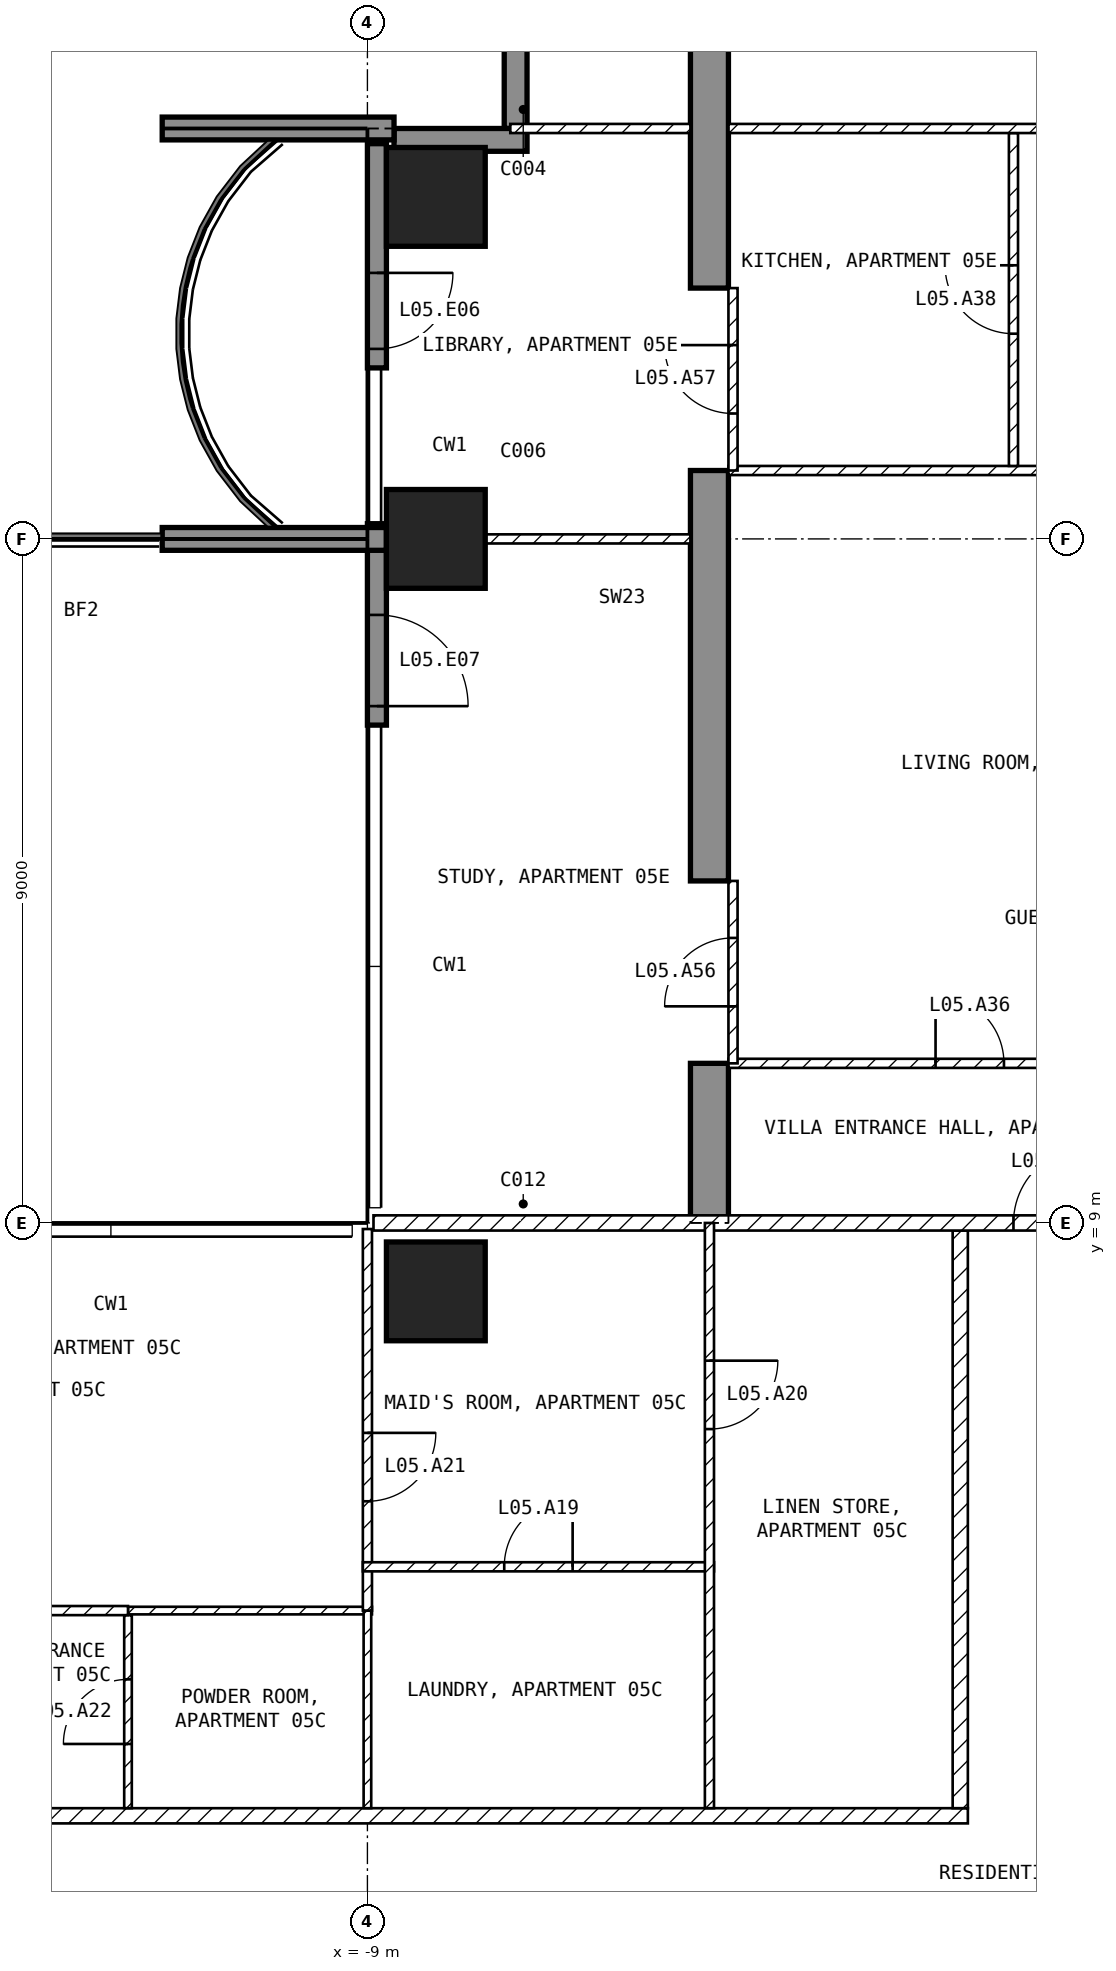
"""IFC4 building model, lengths in metres.
Left out: names, types, materials, properties, quantities, classifications, styles, units other than length and angle.
Written with IfcOpenShell. Run it as: python <this file> out.ifc"""

import sys

from ifc_helpers import new_model, si_unit, direction, frame, frame_2d, origin, origin_2d, place, context, subcontext, project, spatial, polyline, rectangle, outline, extrude, element, fill, save


model = new_model("IFC4")
c1 = context("Model", 3, precision=1e-05, world=origin(), true_north=direction((0.0, 1.0)))
c2 = subcontext(c1, "Body", "Model", "MODEL_VIEW")
j1 = project(units=[si_unit("LENGTHUNIT", "METRE"), si_unit("PLANEANGLEUNIT", "RADIAN")], contexts=[c1])
p1 = place(None, origin())
s1 = spatial("IfcSite", under=j1, at=p1, CompositionType="ELEMENT")
p2 = place(p1, origin())
s2 = spatial("IfcBuilding", under=s1, at=p2, CompositionType="ELEMENT")
p3 = place(p2, frame((0.0, 0.0, 36.5)))
s3 = spatial("IfcBuildingStorey", under=s2, at=p3, CompositionType="ELEMENT", Elevation=36.5)
for number, where, z_axis, x_axis in (
    (1, (-8.1, 8.1, -0.25), (0.0, 0.0, 1.0), (1.0, 0.0, 0.0)),
    (2, (-8.1, 18.0, -0.25), (0.0, 0.0, 1.0), (1.0, 0.0, 0.0)),
    (3, (-8.1, 22.5, -0.25), (0.0, 0.0, 1.0), (1.0, 0.0, 0.0)),
):
    element("IfcColumn", number, at=place(p3, frame(where, z_axis=z_axis, x_axis=x_axis)), inside=s3, PredefinedType="COLUMN", context=c2, shape_type="SweptSolid", body=[
        extrude(rectangle(XDim=1.3, YDim=1.3, at=origin_2d()), origin(), (0.0, 0.0, 1.0), 3.5),
    ])
p4 = place(p3, frame((-4.75, 9.0, -0.25), z_axis=(1.0, 0.0, 0.0), x_axis=(0.0, 1.0, 0.0)))
e4 = element("IfcWall", 4, at=p4, inside=s3, PredefinedType="SHEAR", context=c2, shape_type="SweptSolid", body=[
    extrude(outline(polyline([(0.0, 0.0), (2.1, 0.0), (2.1, 2.65), (4.5, 2.65), (4.5, 0.0), (9.9, 0.0), (9.9, 2.65), (12.3, 2.65), (12.3, 0.0), (16.45, 0.0), (16.45, 3.5), (0.0, 3.5), (0.0, 0.0)])), origin(), (0.0, 0.0, 1.0), 0.5),
])
p5 = place(p3, frame((-8.875, 23.2, 0.0), z_axis=(0.0, 0.0, 1.0), x_axis=(0.0, -1.0, 0.0)))
e5 = element("IfcWall", 5, at=p5, inside=s3, PredefinedType="SOLIDWALL", context=c2, shape_type="SweptSolid", body=[
    extrude(rectangle(XDim=2.95, YDim=0.25, at=frame_2d((1.475, 0.0))), origin(), (0.0, 0.0, 1.0), 3.25),
])
p6 = place(p5, frame((1.7, 0.0, 0.0)))
e6 = element("IfcOpeningElement", 6, at=p6, cuts=e5, PredefinedType="OPENING", context=c2, shape_type="SweptSolid", body=[
    extrude(rectangle(XDim=1.0, YDim=2.4, at=frame_2d((0.5, 1.2))), frame((0.0, 0.135, 0.0), z_axis=(0.0, -1.0, 0.0), x_axis=(1.0, 0.0, 0.0)), (0.0, 0.0, 1.0), 0.27),
])
p7 = place(p3, frame((-8.875, 18.2, 0.0), z_axis=(0.0, 0.0, 1.0), x_axis=(0.0, -1.0, 0.0)))
e7 = element("IfcWall", 7, at=p7, inside=s3, PredefinedType="SOLIDWALL", context=c2, shape_type="SweptSolid", body=[
    extrude(rectangle(XDim=2.65, YDim=0.25, at=frame_2d((1.325, 0.0))), origin(), (0.0, 0.0, 1.0), 3.25),
])
p8 = place(p7, frame((1.2, 0.0, 0.0)))
e8 = element("IfcOpeningElement", 8, at=p8, cuts=e7, PredefinedType="OPENING", context=c2, shape_type="SweptSolid", body=[
    extrude(rectangle(XDim=1.2, YDim=2.4, at=frame_2d((0.6, 1.2))), frame((0.0, 0.135, 0.0), z_axis=(0.0, -1.0, 0.0), x_axis=(1.0, 0.0, 0.0)), (0.0, 0.0, 1.0), 0.27),
])
p9 = place(p3, frame((-7.05, 25.2, 0.0), z_axis=(0.0, 0.0, 1.0), x_axis=(0.0, -1.0, 0.0)))
e9 = element("IfcWall", 9, at=p9, inside=s3, PredefinedType="SOLIDWALL", context=c2, shape_type="SweptSolid", body=[
    extrude(rectangle(XDim=1.8, YDim=0.3, at=frame_2d((0.9, 0.0))), origin(), (0.0, 0.0, 1.0), 3.25),
])
p10 = place(p3, frame((-6.9, 23.25, 0.0), z_axis=(0.0, 0.0, 1.0), x_axis=(-1.0, 0.0, 0.0)))
e10 = element("IfcWall", 10, at=p10, inside=s3, PredefinedType="SOLIDWALL", context=c2, shape_type="SweptSolid", body=[
    extrude(rectangle(XDim=1.75, YDim=0.3, at=frame_2d((0.875, 0.0))), origin(), (0.0, 0.0, 1.0), 3.25),
])
p11 = place(p3, frame((-8.75, 18.0, 0.0), z_axis=(0.0, 0.0, 1.0), x_axis=(-1.0, 0.0, 0.0)))
e11 = element("IfcWall", 11, at=p11, inside=s3, PredefinedType="SOLIDWALL", context=c2, shape_type="SweptSolid", body=[
    extrude(rectangle(XDim=2.95, YDim=0.3, at=frame_2d((1.475, 0.0))), origin(), (0.0, 0.0, 1.0), 3.25),
])
p12 = place(p3, frame((-8.65, 23.4, 0.0), z_axis=(0.0, 0.0, 1.0), x_axis=(-1.0, 0.0, 0.0)))
e12 = element("IfcWall", 12, at=p12, inside=s3, PredefinedType="SOLIDWALL", context=c2, shape_type="SweptSolid", body=[
    extrude(rectangle(XDim=3.05, YDim=0.3, at=frame_2d((1.525, 0.0))), origin(), (0.0, 0.0, 1.0), 3.25),
])
p13 = place(p3, frame((-21.6, 1.2, 0.0), z_axis=(0.0, 0.0, 1.0), x_axis=(1.0, 0.0, 0.0)))
e13 = element("IfcWall", 13, at=p13, inside=s3, PredefinedType="PARTITIONING", context=c2, shape_type="SweptSolid", body=[
    extrude(rectangle(XDim=20.5, YDim=0.2, at=frame_2d((10.25, 0.0))), origin(), (0.0, 0.0, 1.0), 3.25),
])
p14 = place(p13, frame((7.225, 0.0, 0.0)))
e14 = element("IfcOpeningElement", 14, at=p14, cuts=e13, PredefinedType="OPENING", context=c2, shape_type="SweptSolid", body=[
    extrude(rectangle(XDim=1.0, YDim=2.1, at=frame_2d((0.5, 1.05))), frame((0.0, 0.11, 0.0), z_axis=(0.0, -1.0, 0.0), x_axis=(1.0, 0.0, 0.0)), (0.0, 0.0, 1.0), 0.22),
])
p15 = place(p3, frame((-1.2, 1.3, 0.0), z_axis=(0.0, 0.0, 1.0), x_axis=(0.0, 1.0, 0.0)))
e15 = element("IfcWall", 15, at=p15, inside=s3, PredefinedType="PARTITIONING", context=c2, shape_type="SweptSolid", body=[
    extrude(rectangle(XDim=7.6, YDim=0.2, at=frame_2d((3.8, 0.0))), origin(), (0.0, 0.0, 1.0), 3.25),
])
p16 = place(p3, frame((-8.92, 9.0, 0.0), z_axis=(0.0, 0.0, 1.0), x_axis=(1.0, 0.0, 0.0)))
e16 = element("IfcWall", 16, at=p16, inside=s3, PredefinedType="PARTITIONING", context=c2, shape_type="SweptSolid", body=[
    extrude(rectangle(XDim=17.84, YDim=0.2, at=frame_2d((8.92, 0.0))), origin(), (0.0, 0.0, 1.0), 3.25),
])
p17 = place(p16, frame((8.42, 0.0, 0.0)))
e17 = element("IfcOpeningElement", 17, at=p17, cuts=e16, PredefinedType="OPENING", context=c2, shape_type="SweptSolid", body=[
    extrude(rectangle(XDim=1.0, YDim=2.1, at=frame_2d((0.5, 1.05))), frame((0.0, 0.11, 0.0), z_axis=(0.0, -1.0, 0.0), x_axis=(1.0, 0.0, 0.0)), (0.0, 0.0, 1.0), 0.22),
])
p18 = place(p3, frame((-12.15, 1.3, 0.0), z_axis=(0.0, 0.0, 1.0), x_axis=(0.0, 1.0, 0.0)))
e18 = element("IfcWall", 18, at=p18, inside=s3, PredefinedType="PARTITIONING", context=c2, shape_type="SweptSolid", body=[
    extrude(rectangle(XDim=2.54, YDim=0.1, at=frame_2d((1.27, 0.0))), origin(), (0.0, 0.0, 1.0), 3.25),
])
p19 = place(p18, frame((0.845, 0.0, 0.0)))
e19 = element("IfcOpeningElement", 19, at=p19, cuts=e18, PredefinedType="OPENING", context=c2, shape_type="SweptSolid", body=[
    extrude(rectangle(XDim=0.85, YDim=2.1, at=frame_2d((0.425, 1.05))), frame((0.0, 0.06, 0.0), z_axis=(0.0, -1.0, 0.0), x_axis=(1.0, 0.0, 0.0)), (0.0, 0.0, 1.0), 0.12),
])
p20 = place(p3, frame((-12.15, 3.9, 0.0), z_axis=(0.0, 0.0, 1.0), x_axis=(1.0, 0.0, 0.0)))
e20 = element("IfcWall", 20, at=p20, inside=s3, PredefinedType="PARTITIONING", context=c2, shape_type="SweptSolid", body=[
    extrude(rectangle(XDim=3.21, YDim=0.1, at=frame_2d((1.605, 0.0))), origin(), (0.0, 0.0, 1.0), 3.25),
])
p21 = place(p3, frame((-9.0, 3.9, 0.0), z_axis=(0.0, 0.0, 1.0), x_axis=(0.0, -1.0, 0.0)))
e21 = element("IfcWall", 21, at=p21, inside=s3, PredefinedType="PARTITIONING", context=c2, shape_type="SweptSolid", body=[
    extrude(rectangle(XDim=2.6, YDim=0.1, at=frame_2d((1.3, 0.0))), origin(), (0.0, 0.0, 1.0), 3.25),
])
p22 = place(p3, frame((-21.6, 3.9, 0.0), z_axis=(0.0, 0.0, 1.0), x_axis=(1.0, 0.0, 0.0)))
e22 = element("IfcWall", 22, at=p22, inside=s3, PredefinedType="PARTITIONING", context=c2, shape_type="SweptSolid", body=[
    extrude(rectangle(XDim=9.45, YDim=0.12, at=frame_2d((4.725, 0.0))), origin(), (0.0, 0.0, 1.0), 3.25),
])
p23 = place(p22, frame((7.425, 0.0, 0.0)))
e23 = element("IfcOpeningElement", 23, at=p23, cuts=e22, PredefinedType="OPENING", context=c2, shape_type="SweptSolid", body=[
    extrude(rectangle(XDim=0.9, YDim=2.1, at=frame_2d((0.45, 1.05))), frame((0.0, 0.07, 0.0), z_axis=(0.0, -1.0, 0.0), x_axis=(1.0, 0.0, 0.0)), (0.0, 0.0, 1.0), 0.14),
])
p24 = place(p22, frame((0.45, 0.0, 0.0)))
e24 = element("IfcOpeningElement", 24, at=p24, cuts=e22, PredefinedType="OPENING", context=c2, shape_type="SweptSolid", body=[
    extrude(rectangle(XDim=0.9, YDim=2.1, at=frame_2d((0.45, 1.05))), frame((0.0, 0.07, 0.0), z_axis=(0.0, -1.0, 0.0), x_axis=(1.0, 0.0, 0.0)), (0.0, 0.0, 1.0), 0.14),
])
p25 = place(p3, frame((-9.0, 8.92, 0.0), z_axis=(0.0, 0.0, 1.0), x_axis=(0.0, -1.0, 0.0)))
e25 = element("IfcWall", 25, at=p25, inside=s3, PredefinedType="PARTITIONING", context=c2, shape_type="SweptSolid", body=[
    extrude(rectangle(XDim=5.02, YDim=0.12, at=frame_2d((2.51, 0.0))), origin(), (0.0, 0.0, 1.0), 3.25),
])
p26 = place(p25, frame((2.682, 0.0, 0.0)))
e26 = element("IfcOpeningElement", 26, at=p26, cuts=e25, PredefinedType="OPENING", context=c2, shape_type="SweptSolid", body=[
    extrude(rectangle(XDim=0.9, YDim=2.1, at=frame_2d((0.45, 1.05))), frame((0.0, 0.07, 0.0), z_axis=(0.0, -1.0, 0.0), x_axis=(1.0, 0.0, 0.0)), (0.0, 0.0, 1.0), 0.14),
])
p27 = place(p3, frame((-9.06, 4.476, 0.0), z_axis=(0.0, 0.0, 1.0), x_axis=(1.0, 0.0, 0.0)))
e27 = element("IfcWall", 27, at=p27, inside=s3, PredefinedType="PARTITIONING", context=c2, shape_type="SweptSolid", body=[
    extrude(rectangle(XDim=4.62, YDim=0.12, at=frame_2d((2.31, 0.0))), origin(), (0.0, 0.0, 1.0), 3.25),
])
p28 = place(p27, frame((1.86, 0.0, 0.0)))
e28 = element("IfcOpeningElement", 28, at=p28, cuts=e27, PredefinedType="OPENING", context=c2, shape_type="SweptSolid", body=[
    extrude(rectangle(XDim=0.9, YDim=2.1, at=frame_2d((0.45, 1.05))), frame((0.0, 0.07, 0.0), z_axis=(0.0, -1.0, 0.0), x_axis=(1.0, 0.0, 0.0)), (0.0, 0.0, 1.0), 0.14),
])
p29 = place(p3, frame((-4.5, 9.0, 0.0), z_axis=(0.0, 0.0, 1.0), x_axis=(0.0, -1.0, 0.0)))
e29 = element("IfcWall", 29, at=p29, inside=s3, PredefinedType="PARTITIONING", context=c2, shape_type="SweptSolid", body=[
    extrude(rectangle(XDim=7.7, YDim=0.12, at=frame_2d((3.85, 0.0))), origin(), (0.0, 0.0, 1.0), 3.25),
])
p30 = place(p29, frame((1.812, 0.0, 0.0)))
e30 = element("IfcOpeningElement", 30, at=p30, cuts=e29, PredefinedType="OPENING", context=c2, shape_type="SweptSolid", body=[
    extrude(rectangle(XDim=0.9, YDim=2.1, at=frame_2d((0.45, 1.05))), frame((0.0, 0.07, 0.0), z_axis=(0.0, -1.0, 0.0), x_axis=(1.0, 0.0, 0.0)), (0.0, 0.0, 1.0), 0.14),
])
p31 = place(p3, frame((-4.25, 11.1, 0.0), z_axis=(0.0, 0.0, 1.0), x_axis=(1.0, 0.0, 0.0)))
e31 = element("IfcWall", 31, at=p31, inside=s3, PredefinedType="PARTITIONING", context=c2, shape_type="SweptSolid", body=[
    extrude(rectangle(XDim=6.35, YDim=0.12, at=frame_2d((3.175, 0.0))), origin(), (0.0, 0.0, 1.0), 3.25),
])
p32 = place(p31, frame((2.725, 0.0, 0.0)))
e32 = element("IfcOpeningElement", 32, at=p32, cuts=e31, PredefinedType="OPENING", context=c2, shape_type="SweptSolid", body=[
    extrude(rectangle(XDim=0.9, YDim=2.1, at=frame_2d((0.45, 1.05))), frame((0.0, 0.07, 0.0), z_axis=(0.0, -1.0, 0.0), x_axis=(1.0, 0.0, 0.0)), (0.0, 0.0, 1.0), 0.14),
])
p33 = place(p3, frame((-4.25, 18.9, 0.0), z_axis=(0.0, 0.0, 1.0), x_axis=(1.0, 0.0, 0.0)))
e33 = element("IfcWall", 33, at=p33, inside=s3, PredefinedType="PARTITIONING", context=c2, shape_type="SweptSolid", body=[
    extrude(rectangle(XDim=8.5, YDim=0.12, at=frame_2d((4.25, 0.0))), origin(), (0.0, 0.0, 1.0), 3.25),
])
p34 = place(p33, frame((5.675, 0.0, 0.0)))
e34 = element("IfcOpeningElement", 34, at=p34, cuts=e33, PredefinedType="OPENING", context=c2, shape_type="SweptSolid", body=[
    extrude(rectangle(XDim=0.9, YDim=2.1, at=frame_2d((0.45, 1.05))), frame((0.0, 0.07, 0.0), z_axis=(0.0, -1.0, 0.0), x_axis=(1.0, 0.0, 0.0)), (0.0, 0.0, 1.0), 0.14),
])
p35 = place(p3, frame((-0.5, 18.96, 0.0), z_axis=(0.0, 0.0, 1.0), x_axis=(0.0, 1.0, 0.0)))
e35 = element("IfcWall", 35, at=p35, inside=s3, PredefinedType="PARTITIONING", context=c2, shape_type="SweptSolid", body=[
    extrude(rectangle(XDim=4.38, YDim=0.12, at=frame_2d((2.19, 0.0))), origin(), (0.0, 0.0, 1.0), 3.25),
])
p36 = place(p35, frame((1.74, 0.0, 0.0)))
e36 = element("IfcOpeningElement", 36, at=p36, cuts=e35, PredefinedType="OPENING", context=c2, shape_type="SweptSolid", body=[
    extrude(rectangle(XDim=0.9, YDim=2.1, at=frame_2d((0.45, 1.05))), frame((0.0, 0.07, 0.0), z_axis=(0.0, -1.0, 0.0), x_axis=(1.0, 0.0, 0.0)), (0.0, 0.0, 1.0), 0.14),
])
p37 = place(p3, frame((-4.25, 23.4, 0.0), z_axis=(0.0, 0.0, 1.0), x_axis=(1.0, 0.0, 0.0)))
e37 = element("IfcWall", 37, at=p37, inside=s3, PredefinedType="PARTITIONING", context=c2, shape_type="SweptSolid", body=[
    extrude(rectangle(XDim=8.5, YDim=0.12, at=frame_2d((4.25, 0.0))), origin(), (0.0, 0.0, 1.0), 3.25),
])
p38 = place(p37, frame((5.675, 0.0, 0.0)))
e38 = element("IfcOpeningElement", 38, at=p38, cuts=e37, PredefinedType="OPENING", context=c2, shape_type="SweptSolid", body=[
    extrude(rectangle(XDim=0.9, YDim=2.1, at=frame_2d((0.45, 1.05))), frame((0.0, 0.07, 0.0), z_axis=(0.0, -1.0, 0.0), x_axis=(1.0, 0.0, 0.0)), (0.0, 0.0, 1.0), 0.14),
])
p39 = place(p3, frame((-7.45, 18.0, 0.0), z_axis=(0.0, 0.0, 1.0), x_axis=(1.0, 0.0, 0.0)))
e39 = element("IfcWall", 39, at=p39, inside=s3, PredefinedType="PARTITIONING", context=c2, shape_type="SweptSolid", body=[
    extrude(rectangle(XDim=2.7, YDim=0.12, at=frame_2d((1.35, 0.0))), origin(), (0.0, 0.0, 1.0), 2.346),
])
p40 = place(p3, frame((-7.12, 23.4, 0.0), z_axis=(0.0, 0.0, 1.0), x_axis=(1.0, 0.0, 0.0)))
e40 = element("IfcWall", 40, at=p40, inside=s3, PredefinedType="PARTITIONING", context=c2, shape_type="SweptSolid", body=[
    extrude(rectangle(XDim=2.37, YDim=0.12, at=frame_2d((1.185, 0.0))), origin(), (0.0, 0.0, 1.0), 3.25),
])
p41 = place(p3, frame((-4.19, 11.1, 0.0), z_axis=(0.0, 0.0, 1.0), x_axis=(0.0, 1.0, 0.0)))
e41 = element("IfcWall", 41, at=p41, inside=s3, PredefinedType="PARTITIONING", context=c2, shape_type="SweptSolid", body=[
    extrude(rectangle(XDim=2.4, YDim=0.12, at=frame_2d((1.2, 0.0))), origin(), (0.0, 0.0, 1.0), 2.4),
])
p42 = place(p41, frame((0.75, 0.0, 0.0)))
e42 = element("IfcOpeningElement", 42, at=p42, cuts=e41, PredefinedType="OPENING", context=c2, shape_type="SweptSolid", body=[
    extrude(rectangle(XDim=0.9, YDim=2.1, at=frame_2d((0.45, 1.05))), frame((0.0, 0.07, 0.0), z_axis=(0.0, -1.0, 0.0), x_axis=(1.0, 0.0, 0.0)), (0.0, 0.0, 1.0), 0.14),
])
p43 = place(p3, frame((-4.19, 18.9, 0.0), z_axis=(0.0, 0.0, 1.0), x_axis=(0.0, 1.0, 0.0)))
e43 = element("IfcWall", 43, at=p43, inside=s3, PredefinedType="PARTITIONING", context=c2, shape_type="SweptSolid", body=[
    extrude(rectangle(XDim=2.4, YDim=0.12, at=frame_2d((1.2, 0.0))), origin(), (0.0, 0.0, 1.0), 2.4),
])
p44 = place(p43, frame((0.75, 0.0, 0.0)))
e44 = element("IfcOpeningElement", 44, at=p44, cuts=e43, PredefinedType="OPENING", context=c2, shape_type="SweptSolid", body=[
    extrude(rectangle(XDim=0.9, YDim=2.1, at=frame_2d((0.45, 1.05))), frame((0.0, 0.07, 0.0), z_axis=(0.0, -1.0, 0.0), x_axis=(1.0, 0.0, 0.0)), (0.0, 0.0, 1.0), 0.14),
])
p45 = place(p6, origin())
e45 = element("IfcDoor", 45, at=p45, inside=s3, OperationType="SINGLE_SWING_LEFT", PredefinedType="DOOR", context=c2, shape_type="SweptSolid", body=[
    extrude(rectangle(XDim=1.0, YDim=2.4, at=frame_2d((0.5, 1.2))), frame((0.0, 0.025, 0.0), z_axis=(0.0, -1.0, 0.0), x_axis=(1.0, 0.0, 0.0)), (0.0, 0.0, 1.0), 0.05),
])
fill(e6, e45)
p46 = place(p8, origin())
e46 = element("IfcDoor", 46, at=p46, inside=s3, OperationType="SINGLE_SWING_RIGHT", PredefinedType="DOOR", context=c2, shape_type="SweptSolid", body=[
    extrude(rectangle(XDim=1.2, YDim=2.4, at=frame_2d((0.6, 1.2))), frame((0.0, 0.025, 0.0), z_axis=(0.0, -1.0, 0.0), x_axis=(1.0, 0.0, 0.0)), (0.0, 0.0, 1.0), 0.05),
])
fill(e8, e46)
p47 = place(p28, origin())
e47 = element("IfcDoor", 47, at=p47, inside=s3, OperationType="SINGLE_SWING_RIGHT", PredefinedType="DOOR", context=c2, shape_type="SweptSolid", body=[
    extrude(rectangle(XDim=0.9, YDim=2.1, at=frame_2d((0.45, 1.05))), frame((0.0, 0.025, 0.0), z_axis=(0.0, -1.0, 0.0), x_axis=(1.0, 0.0, 0.0)), (0.0, 0.0, 1.0), 0.05),
])
fill(e28, e47)
p48 = place(p30, origin())
e48 = element("IfcDoor", 48, at=p48, inside=s3, OperationType="SINGLE_SWING_LEFT", PredefinedType="DOOR", context=c2, shape_type="SweptSolid", body=[
    extrude(rectangle(XDim=0.9, YDim=2.1, at=frame_2d((0.45, 1.05))), frame((0.0, 0.025, 0.0), z_axis=(0.0, -1.0, 0.0), x_axis=(1.0, 0.0, 0.0)), (0.0, 0.0, 1.0), 0.05),
])
fill(e30, e48)
p49 = place(p26, origin())
e49 = element("IfcDoor", 49, at=p49, inside=s3, OperationType="SINGLE_SWING_LEFT", PredefinedType="DOOR", context=c2, shape_type="SweptSolid", body=[
    extrude(rectangle(XDim=0.9, YDim=2.1, at=frame_2d((0.45, 1.05))), frame((0.0, 0.025, 0.0), z_axis=(0.0, -1.0, 0.0), x_axis=(1.0, 0.0, 0.0)), (0.0, 0.0, 1.0), 0.05),
])
fill(e26, e49)
p50 = place(p19, origin())
e50 = element("IfcDoor", 50, at=p50, inside=s3, OperationType="SINGLE_SWING_LEFT", PredefinedType="DOOR", context=c2, shape_type="SweptSolid", body=[
    extrude(rectangle(XDim=0.85, YDim=2.1, at=frame_2d((0.425, 1.05))), frame((0.0, 0.025, 0.0), z_axis=(0.0, -1.0, 0.0), x_axis=(1.0, 0.0, 0.0)), (0.0, 0.0, 1.0), 0.05),
])
fill(e19, e50)
p51 = place(p17, origin())
e51 = element("IfcDoor", 51, at=p51, inside=s3, OperationType="SINGLE_SWING_RIGHT", PredefinedType="DOOR", context=c2, shape_type="SweptSolid", body=[
    extrude(rectangle(XDim=1.0, YDim=2.1, at=frame_2d((0.5, 1.05))), frame((0.0, 0.025, 0.0), z_axis=(0.0, -1.0, 0.0), x_axis=(1.0, 0.0, 0.0)), (0.0, 0.0, 1.0), 0.05),
])
fill(e17, e51)
p52 = place(p32, origin())
e52 = element("IfcDoor", 52, at=p52, inside=s3, OperationType="SINGLE_SWING_LEFT", PredefinedType="DOOR", context=c2, shape_type="SweptSolid", body=[
    extrude(rectangle(XDim=0.9, YDim=2.1, at=frame_2d((0.45, 1.05))), frame((0.0, 0.025, 0.0), z_axis=(0.0, -1.0, 0.0), x_axis=(1.0, 0.0, 0.0)), (0.0, 0.0, 1.0), 0.05),
])
fill(e32, e52)
p53 = place(p36, origin())
e53 = element("IfcDoor", 53, at=p53, inside=s3, OperationType="SINGLE_SWING_RIGHT", PredefinedType="DOOR", context=c2, shape_type="SweptSolid", body=[
    extrude(rectangle(XDim=0.9, YDim=2.1, at=frame_2d((0.45, 1.05))), frame((0.0, 0.025, 0.0), z_axis=(0.0, -1.0, 0.0), x_axis=(1.0, 0.0, 0.0)), (0.0, 0.0, 1.0), 0.05),
])
fill(e36, e53)
p54 = place(p42, origin())
e54 = element("IfcDoor", 54, at=p54, inside=s3, OperationType="SINGLE_SWING_LEFT", PredefinedType="DOOR", context=c2, shape_type="SweptSolid", body=[
    extrude(rectangle(XDim=0.9, YDim=2.1, at=frame_2d((0.45, 1.05))), frame((0.0, 0.025, 0.0), z_axis=(0.0, -1.0, 0.0), x_axis=(1.0, 0.0, 0.0)), (0.0, 0.0, 1.0), 0.05),
])
fill(e42, e54)
p55 = place(p44, origin())
e55 = element("IfcDoor", 55, at=p55, inside=s3, OperationType="SINGLE_SWING_RIGHT", PredefinedType="DOOR", context=c2, shape_type="SweptSolid", body=[
    extrude(rectangle(XDim=0.9, YDim=2.1, at=frame_2d((0.45, 1.05))), frame((0.0, 0.025, 0.0), z_axis=(0.0, -1.0, 0.0), x_axis=(1.0, 0.0, 0.0)), (0.0, 0.0, 1.0), 0.05),
])
fill(e44, e55)
save(model, sys.argv[1])
